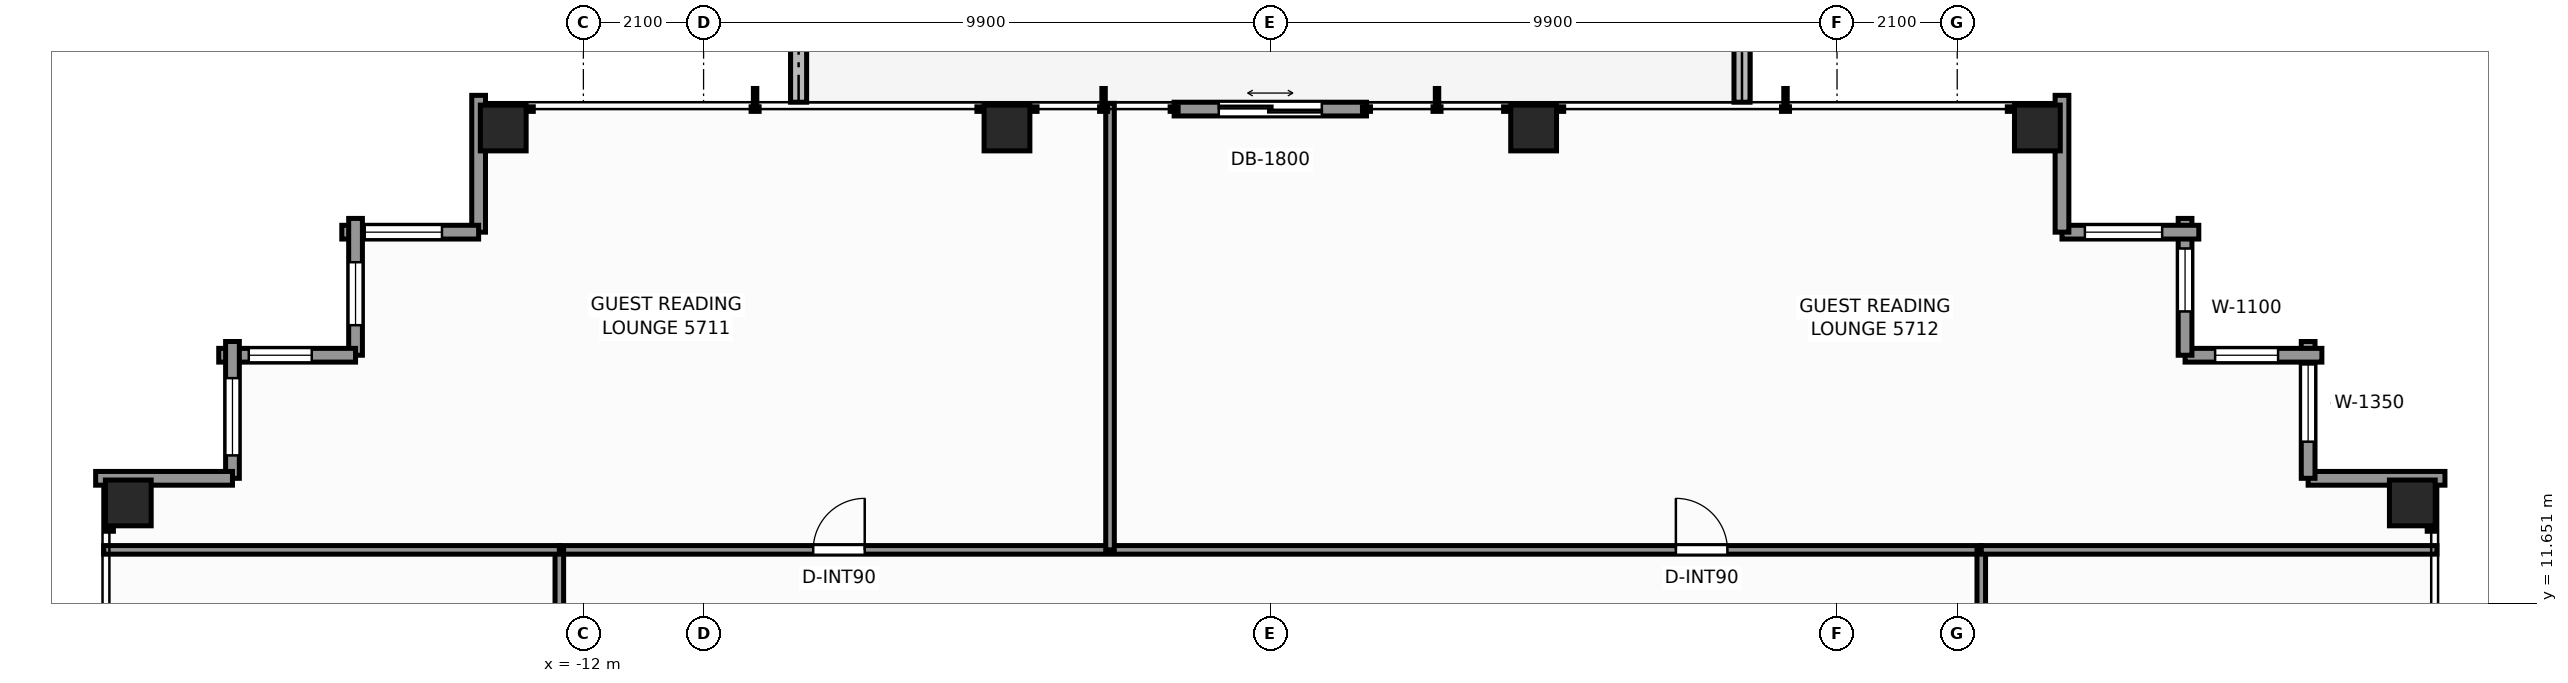
"""IFC4 building model, lengths in metres.
Left out: names, types, materials, properties, quantities, classifications, styles, units other than length and angle.
Written with IfcOpenShell. Run it as: python <this file> out.ifc"""

import sys

from ifc_helpers import new_model, si_unit, direction, frame, frame_2d, origin, origin_2d, place, context, subcontext, project, spatial, rectangle, extrude, element, fill, save


model = new_model("IFC4")
c1 = context("Model", 3, precision=1e-05, world=origin(), true_north=direction((0.0, 1.0)))
c2 = subcontext(c1, "Body", "Model", "MODEL_VIEW")
j1 = project(units=[si_unit("LENGTHUNIT", "METRE"), si_unit("PLANEANGLEUNIT", "RADIAN")], contexts=[c1])
p1 = place(None, origin())
s1 = spatial("IfcSite", under=j1, at=p1, CompositionType="ELEMENT")
p2 = place(p1, origin())
s2 = spatial("IfcBuilding", under=s1, at=p2, CompositionType="ELEMENT")
p3 = place(p2, frame((0.0, 0.0, 196.5)))
s3 = spatial("IfcBuildingStorey", under=s2, at=p3, CompositionType="ELEMENT", Elevation=196.5)
for number, where, z_axis, x_axis in (
    (1, (-13.4, 19.95, 0.0), (0.0, 0.0, 1.0), (1.0, 0.0, 0.0)),
    (2, (-4.6, 19.95, 0.0), (0.0, 0.0, 1.0), (1.0, 0.0, 0.0)),
    (3, (4.6, 19.95, 0.0), (0.0, 0.0, 1.0), (1.0, 0.0, 0.0)),
    (4, (13.4, 19.95, 0.0), (0.0, 0.0, 1.0), (1.0, 0.0, 0.0)),
    (5, (-19.95, 13.4, 0.0), (0.0, 0.0, 1.0), (1.0, 0.0, 0.0)),
    (6, (19.95, 13.4, 0.0), (0.0, 0.0, 1.0), (1.0, 0.0, 0.0)),
):
    element("IfcColumn", number, at=place(p3, frame(where, z_axis=z_axis, x_axis=x_axis)), inside=s3, PredefinedType="COLUMN", context=c2, shape_type="SweptSolid", body=[
        extrude(rectangle(XDim=0.8, YDim=0.8, at=origin_2d()), origin(), (0.0, 0.0, 1.0), 3.3),
    ])
p4 = place(p3, frame((8.24, 20.4, -0.04), z_axis=(0.0, 0.0, 1.0), x_axis=(0.0, 1.0, 0.0)))
e7 = element("IfcWall", 7, at=p4, inside=s3, PredefinedType="PARAPET", context=c2, shape_type="SweptSolid", body=[
    extrude(rectangle(XDim=2.34, YDim=0.28, at=frame_2d((1.17, 0.0))), origin(), (0.0, 0.0, 1.0), 0.42),
])
p5 = place(p3, frame((-8.24, 23.767, -0.04), z_axis=(0.0, 0.0, 1.0), x_axis=(0.0, -1.0, 0.0)))
e8 = element("IfcWall", 8, at=p5, inside=s3, PredefinedType="PARAPET", context=c2, shape_type="SweptSolid", body=[
    extrude(rectangle(XDim=3.367, YDim=0.28, at=frame_2d((1.684, 0.0))), origin(), (0.0, 0.0, 1.0), 0.42),
])
p6 = place(p3, frame((18.13, 13.83, 0.0), z_axis=(0.0, 0.0, 1.0), x_axis=(1.0, 0.0, 0.0)))
e9 = element("IfcWall", 9, at=p6, inside=s3, PredefinedType="STANDARD", context=c2, shape_type="SweptSolid", body=[
    extrude(rectangle(XDim=2.39, YDim=0.24, at=frame_2d((1.195, 0.0))), origin(), (0.0, 0.0, 1.0), 2.463),
])
p7 = place(p3, frame((18.13, 16.22, 0.0), z_axis=(0.0, 0.0, 1.0), x_axis=(0.0, -1.0, 0.0)))
e10 = element("IfcWall", 10, at=p7, inside=s3, PredefinedType="STANDARD", context=c2, shape_type="SweptSolid", body=[
    extrude(rectangle(XDim=2.39, YDim=0.24, at=frame_2d((1.195, 0.0))), origin(), (0.0, 0.0, 1.0), 2.463),
])
p8 = place(p7, frame((0.4, 0.0, 0.65)))
e11 = element("IfcOpeningElement", 11, at=p8, cuts=e10, PredefinedType="OPENING", context=c2, shape_type="SweptSolid", body=[
    extrude(rectangle(XDim=1.35, YDim=1.55, at=frame_2d((0.675, 0.775))), frame((0.0, 0.13, 0.0), z_axis=(0.0, -1.0, 0.0), x_axis=(1.0, 0.0, 0.0)), (0.0, 0.0, 1.0), 0.26),
])
p9 = place(p3, frame((15.98, 15.98, 0.0), z_axis=(0.0, 0.0, 1.0), x_axis=(1.0, 0.0, 0.0)))
e12 = element("IfcWall", 12, at=p9, inside=s3, PredefinedType="STANDARD", context=c2, shape_type="SweptSolid", body=[
    extrude(rectangle(XDim=2.39, YDim=0.24, at=frame_2d((1.195, 0.0))), origin(), (0.0, 0.0, 1.0), 2.463),
])
p10 = place(p9, frame((0.525, 0.0, 0.65)))
e13 = element("IfcOpeningElement", 13, at=p10, cuts=e12, PredefinedType="OPENING", context=c2, shape_type="SweptSolid", body=[
    extrude(rectangle(XDim=1.1, YDim=1.45, at=frame_2d((0.55, 0.725))), frame((0.0, 0.13, 0.0), z_axis=(0.0, -1.0, 0.0), x_axis=(1.0, 0.0, 0.0)), (0.0, 0.0, 1.0), 0.26),
])
p11 = place(p3, frame((15.98, 18.37, 0.0), z_axis=(0.0, 0.0, 1.0), x_axis=(0.0, -1.0, 0.0)))
e14 = element("IfcWall", 14, at=p11, inside=s3, PredefinedType="STANDARD", context=c2, shape_type="SweptSolid", body=[
    extrude(rectangle(XDim=2.39, YDim=0.24, at=frame_2d((1.195, 0.0))), origin(), (0.0, 0.0, 1.0), 2.463),
])
p12 = place(p11, frame((0.525, 0.0, 0.65)))
e15 = element("IfcOpeningElement", 15, at=p12, cuts=e14, PredefinedType="OPENING", context=c2, shape_type="SweptSolid", body=[
    extrude(rectangle(XDim=1.1, YDim=1.45, at=frame_2d((0.55, 0.725))), frame((0.0, 0.13, 0.0), z_axis=(0.0, -1.0, 0.0), x_axis=(1.0, 0.0, 0.0)), (0.0, 0.0, 1.0), 0.26),
])
p13 = place(p3, frame((13.83, 18.13, 0.0), z_axis=(0.0, 0.0, 1.0), x_axis=(1.0, 0.0, 0.0)))
e16 = element("IfcWall", 16, at=p13, inside=s3, PredefinedType="STANDARD", context=c2, shape_type="SweptSolid", body=[
    extrude(rectangle(XDim=2.39, YDim=0.24, at=frame_2d((1.195, 0.0))), origin(), (0.0, 0.0, 1.0), 2.463),
])
p14 = place(p13, frame((0.4, 0.0, 0.65)))
e17 = element("IfcOpeningElement", 17, at=p14, cuts=e16, PredefinedType="OPENING", context=c2, shape_type="SweptSolid", body=[
    extrude(rectangle(XDim=1.35, YDim=1.55, at=frame_2d((0.675, 0.775))), frame((0.0, 0.13, 0.0), z_axis=(0.0, -1.0, 0.0), x_axis=(1.0, 0.0, 0.0)), (0.0, 0.0, 1.0), 0.26),
])
p15 = place(p3, frame((13.83, 20.52, 0.0), z_axis=(0.0, 0.0, 1.0), x_axis=(0.0, -1.0, 0.0)))
e18 = element("IfcWall", 18, at=p15, inside=s3, PredefinedType="STANDARD", context=c2, shape_type="SweptSolid", body=[
    extrude(rectangle(XDim=2.39, YDim=0.24, at=frame_2d((1.195, 0.0))), origin(), (0.0, 0.0, 1.0), 2.463),
])
p16 = place(p3, frame((-1.68, 20.28, 0.0), z_axis=(0.0, 0.0, 1.0), x_axis=(1.0, 0.0, 0.0)))
e19 = element("IfcWall", 19, at=p16, inside=s3, PredefinedType="STANDARD", context=c2, shape_type="SweptSolid", body=[
    extrude(rectangle(XDim=3.36, YDim=0.24, at=frame_2d((1.68, 0.0))), origin(), (0.0, 0.0, 1.0), 3.08),
])
p17 = place(p16, frame((0.78, 0.0, 0.0)))
e20 = element("IfcOpeningElement", 20, at=p17, cuts=e19, PredefinedType="OPENING", context=c2, shape_type="SweptSolid", body=[
    extrude(rectangle(XDim=1.8, YDim=2.2, at=frame_2d((0.9, 1.1))), frame((0.0, 0.13, 0.0), z_axis=(0.0, -1.0, 0.0), x_axis=(1.0, 0.0, 0.0)), (0.0, 0.0, 1.0), 0.26),
])
p18 = place(p3, frame((-13.83, 18.13, 0.0), z_axis=(0.0, 0.0, 1.0), x_axis=(0.0, 1.0, 0.0)))
e21 = element("IfcWall", 21, at=p18, inside=s3, PredefinedType="STANDARD", context=c2, shape_type="SweptSolid", body=[
    extrude(rectangle(XDim=2.39, YDim=0.24, at=frame_2d((1.195, 0.0))), origin(), (0.0, 0.0, 1.0), 2.463),
])
p19 = place(p3, frame((-16.22, 18.13, 0.0), z_axis=(0.0, 0.0, 1.0), x_axis=(1.0, 0.0, 0.0)))
e22 = element("IfcWall", 22, at=p19, inside=s3, PredefinedType="STANDARD", context=c2, shape_type="SweptSolid", body=[
    extrude(rectangle(XDim=2.39, YDim=0.24, at=frame_2d((1.195, 0.0))), origin(), (0.0, 0.0, 1.0), 2.463),
])
p20 = place(p19, frame((0.4, 0.0, 0.65)))
e23 = element("IfcOpeningElement", 23, at=p20, cuts=e22, PredefinedType="OPENING", context=c2, shape_type="SweptSolid", body=[
    extrude(rectangle(XDim=1.35, YDim=1.55, at=frame_2d((0.675, 0.775))), frame((0.0, 0.13, 0.0), z_axis=(0.0, -1.0, 0.0), x_axis=(1.0, 0.0, 0.0)), (0.0, 0.0, 1.0), 0.26),
])
p21 = place(p3, frame((-15.98, 15.98, 0.0), z_axis=(0.0, 0.0, 1.0), x_axis=(0.0, 1.0, 0.0)))
e24 = element("IfcWall", 24, at=p21, inside=s3, PredefinedType="STANDARD", context=c2, shape_type="SweptSolid", body=[
    extrude(rectangle(XDim=2.39, YDim=0.24, at=frame_2d((1.195, 0.0))), origin(), (0.0, 0.0, 1.0), 2.463),
])
p22 = place(p21, frame((0.525, 0.0, 0.65)))
e25 = element("IfcOpeningElement", 25, at=p22, cuts=e24, PredefinedType="OPENING", context=c2, shape_type="SweptSolid", body=[
    extrude(rectangle(XDim=1.1, YDim=1.45, at=frame_2d((0.55, 0.725))), frame((0.0, 0.13, 0.0), z_axis=(0.0, -1.0, 0.0), x_axis=(1.0, 0.0, 0.0)), (0.0, 0.0, 1.0), 0.26),
])
p23 = place(p3, frame((-18.37, 15.98, 0.0), z_axis=(0.0, 0.0, 1.0), x_axis=(1.0, 0.0, 0.0)))
e26 = element("IfcWall", 26, at=p23, inside=s3, PredefinedType="STANDARD", context=c2, shape_type="SweptSolid", body=[
    extrude(rectangle(XDim=2.39, YDim=0.24, at=frame_2d((1.195, 0.0))), origin(), (0.0, 0.0, 1.0), 2.463),
])
p24 = place(p23, frame((0.525, 0.0, 0.65)))
e27 = element("IfcOpeningElement", 27, at=p24, cuts=e26, PredefinedType="OPENING", context=c2, shape_type="SweptSolid", body=[
    extrude(rectangle(XDim=1.1, YDim=1.45, at=frame_2d((0.55, 0.725))), frame((0.0, 0.13, 0.0), z_axis=(0.0, -1.0, 0.0), x_axis=(1.0, 0.0, 0.0)), (0.0, 0.0, 1.0), 0.26),
])
p25 = place(p3, frame((-18.13, 13.83, 0.0), z_axis=(0.0, 0.0, 1.0), x_axis=(0.0, 1.0, 0.0)))
e28 = element("IfcWall", 28, at=p25, inside=s3, PredefinedType="STANDARD", context=c2, shape_type="SweptSolid", body=[
    extrude(rectangle(XDim=2.39, YDim=0.24, at=frame_2d((1.195, 0.0))), origin(), (0.0, 0.0, 1.0), 2.463),
])
p26 = place(p25, frame((0.4, 0.0, 0.65)))
e29 = element("IfcOpeningElement", 29, at=p26, cuts=e28, PredefinedType="OPENING", context=c2, shape_type="SweptSolid", body=[
    extrude(rectangle(XDim=1.35, YDim=1.55, at=frame_2d((0.675, 0.775))), frame((0.0, 0.13, 0.0), z_axis=(0.0, -1.0, 0.0), x_axis=(1.0, 0.0, 0.0)), (0.0, 0.0, 1.0), 0.26),
])
p27 = place(p3, frame((-20.52, 13.83, 0.0), z_axis=(0.0, 0.0, 1.0), x_axis=(1.0, 0.0, 0.0)))
e30 = element("IfcWall", 30, at=p27, inside=s3, PredefinedType="STANDARD", context=c2, shape_type="SweptSolid", body=[
    extrude(rectangle(XDim=2.39, YDim=0.24, at=frame_2d((1.195, 0.0))), origin(), (0.0, 0.0, 1.0), 2.463),
])
p28 = place(p3, frame((-12.42, 12.58, 0.0), z_axis=(0.0, 0.0, 1.0), x_axis=(1.0, 0.0, 0.0)))
e31 = element("IfcWall", 31, at=p28, inside=s3, PredefinedType="PARTITIONING", context=c2, shape_type="SweptSolid", body=[
    extrude(rectangle(XDim=24.84, YDim=0.15, at=frame_2d((12.42, 0.0))), origin(), (0.0, 0.0, 1.0), 2.369),
])
p29 = place(p28, frame((4.435, 0.0, 0.0)))
e32 = element("IfcOpeningElement", 32, at=p29, cuts=e31, PredefinedType="OPENING", context=c2, shape_type="SweptSolid", body=[
    extrude(rectangle(XDim=0.9, YDim=2.06, at=frame_2d((0.45, 1.03))), frame((0.0, 0.085, 0.0), z_axis=(0.0, -1.0, 0.0), x_axis=(1.0, 0.0, 0.0)), (0.0, 0.0, 1.0), 0.17),
])
p30 = place(p28, frame((19.505, 0.0, 0.0)))
e33 = element("IfcOpeningElement", 33, at=p30, cuts=e31, PredefinedType="OPENING", context=c2, shape_type="SweptSolid", body=[
    extrude(rectangle(XDim=0.9, YDim=2.06, at=frame_2d((0.45, 1.03))), frame((0.0, 0.085, 0.0), z_axis=(0.0, -1.0, 0.0), x_axis=(1.0, 0.0, 0.0)), (0.0, 0.0, 1.0), 0.17),
])
p31 = place(p3, frame((-12.42, -12.26, 0.0), z_axis=(0.0, 0.0, 1.0), x_axis=(0.0, 1.0, 0.0)))
e34 = element("IfcWall", 34, at=p31, inside=s3, PredefinedType="PARTITIONING", context=c2, shape_type="SweptSolid", body=[
    extrude(rectangle(XDim=24.84, YDim=0.15, at=frame_2d((12.42, 0.0))), origin(), (0.0, 0.0, 1.0), 2.369),
])
p32 = place(p31, frame((3.573, 0.0, 0.0)))
e35 = element("IfcOpeningElement", 35, at=p32, cuts=e34, PredefinedType="OPENING", context=c2, shape_type="SweptSolid", body=[
    extrude(rectangle(XDim=0.95, YDim=2.06, at=frame_2d((0.475, 1.03))), frame((0.0, 0.085, 0.0), z_axis=(0.0, -1.0, 0.0), x_axis=(1.0, 0.0, 0.0)), (0.0, 0.0, 1.0), 0.17),
])
p33 = place(p31, frame((9.755, 0.0, 0.0)))
e36 = element("IfcOpeningElement", 36, at=p33, cuts=e34, PredefinedType="OPENING", context=c2, shape_type="SweptSolid", body=[
    extrude(rectangle(XDim=0.95, YDim=2.06, at=frame_2d((0.475, 1.03))), frame((0.0, 0.085, 0.0), z_axis=(0.0, -1.0, 0.0), x_axis=(1.0, 0.0, 0.0)), (0.0, 0.0, 1.0), 0.17),
])
p34 = place(p31, frame((19.32, 0.0, 0.0)))
e37 = element("IfcOpeningElement", 37, at=p34, cuts=e34, PredefinedType="OPENING", context=c2, shape_type="SweptSolid", body=[
    extrude(rectangle(XDim=0.95, YDim=2.06, at=frame_2d((0.475, 1.03))), frame((0.0, 0.085, 0.0), z_axis=(0.0, -1.0, 0.0), x_axis=(1.0, 0.0, 0.0)), (0.0, 0.0, 1.0), 0.17),
])
p35 = place(p3, frame((12.42, -12.26, 0.0), z_axis=(0.0, 0.0, 1.0), x_axis=(0.0, 1.0, 0.0)))
e38 = element("IfcWall", 38, at=p35, inside=s3, PredefinedType="PARTITIONING", context=c2, shape_type="SweptSolid", body=[
    extrude(rectangle(XDim=24.84, YDim=0.15, at=frame_2d((12.42, 0.0))), origin(), (0.0, 0.0, 1.0), 2.369),
])
p36 = place(p35, frame((2.944, 0.0, 0.0)))
e39 = element("IfcOpeningElement", 39, at=p36, cuts=e38, PredefinedType="OPENING", context=c2, shape_type="SweptSolid", body=[
    extrude(rectangle(XDim=0.9, YDim=2.06, at=frame_2d((0.45, 1.03))), frame((0.0, 0.085, 0.0), z_axis=(0.0, -1.0, 0.0), x_axis=(1.0, 0.0, 0.0)), (0.0, 0.0, 1.0), 0.17),
])
p37 = place(p35, frame((5.279, 0.0, 0.0)))
e40 = element("IfcOpeningElement", 40, at=p37, cuts=e38, PredefinedType="OPENING", context=c2, shape_type="SweptSolid", body=[
    extrude(rectangle(XDim=0.9, YDim=2.06, at=frame_2d((0.45, 1.03))), frame((0.0, 0.085, 0.0), z_axis=(0.0, -1.0, 0.0), x_axis=(1.0, 0.0, 0.0)), (0.0, 0.0, 1.0), 0.17),
])
p38 = place(p35, frame((13.602, 0.0, 0.0)))
e41 = element("IfcOpeningElement", 41, at=p38, cuts=e38, PredefinedType="OPENING", context=c2, shape_type="SweptSolid", body=[
    extrude(rectangle(XDim=0.9, YDim=2.06, at=frame_2d((0.45, 1.03))), frame((0.0, 0.085, 0.0), z_axis=(0.0, -1.0, 0.0), x_axis=(1.0, 0.0, 0.0)), (0.0, 0.0, 1.0), 0.17),
])
p39 = place(p35, frame((19.098, 0.0, 0.0)))
e42 = element("IfcOpeningElement", 42, at=p39, cuts=e38, PredefinedType="OPENING", context=c2, shape_type="SweptSolid", body=[
    extrude(rectangle(XDim=0.95, YDim=2.06, at=frame_2d((0.475, 1.03))), frame((0.0, 0.085, 0.0), z_axis=(0.0, -1.0, 0.0), x_axis=(1.0, 0.0, 0.0)), (0.0, 0.0, 1.0), 0.17),
])
p40 = place(p35, frame((20.836, 0.0, 0.0)))
e43 = element("IfcOpeningElement", 43, at=p40, cuts=e38, PredefinedType="OPENING", context=c2, shape_type="SweptSolid", body=[
    extrude(rectangle(XDim=0.9, YDim=2.06, at=frame_2d((0.45, 1.03))), frame((0.0, 0.085, 0.0), z_axis=(0.0, -1.0, 0.0), x_axis=(1.0, 0.0, 0.0)), (0.0, 0.0, 1.0), 0.17),
])
for number, where, z_axis, x_axis in (
    (44, (-20.38, 12.58, 0.0), (0.0, 0.0, 1.0), (1.0, 0.0, 0.0)),
    (45, (12.42, 12.58, 0.0), (0.0, 0.0, 1.0), (1.0, 0.0, 0.0)),
):
    element("IfcWall", number, at=place(p3, frame(where, z_axis=z_axis, x_axis=x_axis)), inside=s3, PredefinedType="PARTITIONING", context=c2, shape_type="SweptSolid", body=[
        extrude(rectangle(XDim=7.96, YDim=0.15, at=frame_2d((3.98, 0.0))), origin(), (0.0, 0.0, 1.0), 2.369),
    ])
p41 = place(p3, frame((-2.8, 12.58, 0.0), z_axis=(0.0, 0.0, 1.0), x_axis=(0.0, 1.0, 0.0)))
e46 = element("IfcWall", 46, at=p41, inside=s3, PredefinedType="PARTITIONING", context=c2, shape_type="SweptSolid", body=[
    extrude(rectangle(XDim=7.8, YDim=0.15, at=frame_2d((3.9, 0.0))), origin(), (0.0, 0.0, 1.0), 2.453),
])
p42 = place(p8, origin())
e47 = element("IfcWindow", 47, at=p42, inside=s3, PartitioningType="SINGLE_PANEL", PredefinedType="WINDOW", context=c2, shape_type="SweptSolid", body=[
    extrude(rectangle(XDim=1.35, YDim=1.55, at=frame_2d((0.675, 0.775))), frame((0.0, 0.03, 0.0), z_axis=(0.0, -1.0, 0.0), x_axis=(1.0, 0.0, 0.0)), (0.0, 0.0, 1.0), 0.06),
])
fill(e11, e47)
p43 = place(p10, origin())
e48 = element("IfcWindow", 48, at=p43, inside=s3, PartitioningType="SINGLE_PANEL", PredefinedType="WINDOW", context=c2, shape_type="SweptSolid", body=[
    extrude(rectangle(XDim=1.1, YDim=1.45, at=frame_2d((0.55, 0.725))), frame((0.0, 0.03, 0.0), z_axis=(0.0, -1.0, 0.0), x_axis=(1.0, 0.0, 0.0)), (0.0, 0.0, 1.0), 0.06),
])
fill(e13, e48)
p44 = place(p12, origin())
e49 = element("IfcWindow", 49, at=p44, inside=s3, PartitioningType="SINGLE_PANEL", PredefinedType="WINDOW", context=c2, shape_type="SweptSolid", body=[
    extrude(rectangle(XDim=1.1, YDim=1.45, at=frame_2d((0.55, 0.725))), frame((0.0, 0.03, 0.0), z_axis=(0.0, -1.0, 0.0), x_axis=(1.0, 0.0, 0.0)), (0.0, 0.0, 1.0), 0.06),
])
fill(e15, e49)
p45 = place(p14, origin())
e50 = element("IfcWindow", 50, at=p45, inside=s3, PartitioningType="SINGLE_PANEL", PredefinedType="WINDOW", context=c2, shape_type="SweptSolid", body=[
    extrude(rectangle(XDim=1.35, YDim=1.55, at=frame_2d((0.675, 0.775))), frame((0.0, 0.03, 0.0), z_axis=(0.0, -1.0, 0.0), x_axis=(1.0, 0.0, 0.0)), (0.0, 0.0, 1.0), 0.06),
])
fill(e17, e50)
p46 = place(p17, origin())
e51 = element("IfcDoor", 51, at=p46, inside=s3, OperationType="DOUBLE_DOOR_SLIDING", PredefinedType="DOOR", context=c2, shape_type="SweptSolid", body=[
    extrude(rectangle(XDim=1.8, YDim=2.2, at=frame_2d((0.9, 1.1))), frame((0.0, 0.025, 0.0), z_axis=(0.0, -1.0, 0.0), x_axis=(1.0, 0.0, 0.0)), (0.0, 0.0, 1.0), 0.05),
])
fill(e20, e51)
p47 = place(p20, origin())
e52 = element("IfcWindow", 52, at=p47, inside=s3, PartitioningType="SINGLE_PANEL", PredefinedType="WINDOW", context=c2, shape_type="SweptSolid", body=[
    extrude(rectangle(XDim=1.35, YDim=1.55, at=frame_2d((0.675, 0.775))), frame((0.0, 0.03, 0.0), z_axis=(0.0, -1.0, 0.0), x_axis=(1.0, 0.0, 0.0)), (0.0, 0.0, 1.0), 0.06),
])
fill(e23, e52)
p48 = place(p22, origin())
e53 = element("IfcWindow", 53, at=p48, inside=s3, PartitioningType="SINGLE_PANEL", PredefinedType="WINDOW", context=c2, shape_type="SweptSolid", body=[
    extrude(rectangle(XDim=1.1, YDim=1.45, at=frame_2d((0.55, 0.725))), frame((0.0, 0.03, 0.0), z_axis=(0.0, -1.0, 0.0), x_axis=(1.0, 0.0, 0.0)), (0.0, 0.0, 1.0), 0.06),
])
fill(e25, e53)
p49 = place(p24, origin())
e54 = element("IfcWindow", 54, at=p49, inside=s3, PartitioningType="SINGLE_PANEL", PredefinedType="WINDOW", context=c2, shape_type="SweptSolid", body=[
    extrude(rectangle(XDim=1.1, YDim=1.45, at=frame_2d((0.55, 0.725))), frame((0.0, 0.03, 0.0), z_axis=(0.0, -1.0, 0.0), x_axis=(1.0, 0.0, 0.0)), (0.0, 0.0, 1.0), 0.06),
])
fill(e27, e54)
p50 = place(p26, origin())
e55 = element("IfcWindow", 55, at=p50, inside=s3, PartitioningType="SINGLE_PANEL", PredefinedType="WINDOW", context=c2, shape_type="SweptSolid", body=[
    extrude(rectangle(XDim=1.35, YDim=1.55, at=frame_2d((0.675, 0.775))), frame((0.0, 0.03, 0.0), z_axis=(0.0, -1.0, 0.0), x_axis=(1.0, 0.0, 0.0)), (0.0, 0.0, 1.0), 0.06),
])
fill(e29, e55)
p51 = place(p29, origin())
e56 = element("IfcDoor", 56, at=p51, inside=s3, OperationType="SINGLE_SWING_RIGHT", PredefinedType="DOOR", context=c2, shape_type="SweptSolid", body=[
    extrude(rectangle(XDim=0.9, YDim=2.06, at=frame_2d((0.45, 1.03))), frame((0.0, 0.025, 0.0), z_axis=(0.0, -1.0, 0.0), x_axis=(1.0, 0.0, 0.0)), (0.0, 0.0, 1.0), 0.05),
])
fill(e32, e56)
p52 = place(p30, origin())
e57 = element("IfcDoor", 57, at=p52, inside=s3, OperationType="SINGLE_SWING_LEFT", PredefinedType="DOOR", context=c2, shape_type="SweptSolid", body=[
    extrude(rectangle(XDim=0.9, YDim=2.06, at=frame_2d((0.45, 1.03))), frame((0.0, 0.025, 0.0), z_axis=(0.0, -1.0, 0.0), x_axis=(1.0, 0.0, 0.0)), (0.0, 0.0, 1.0), 0.05),
])
fill(e33, e57)
save(model, sys.argv[1])
